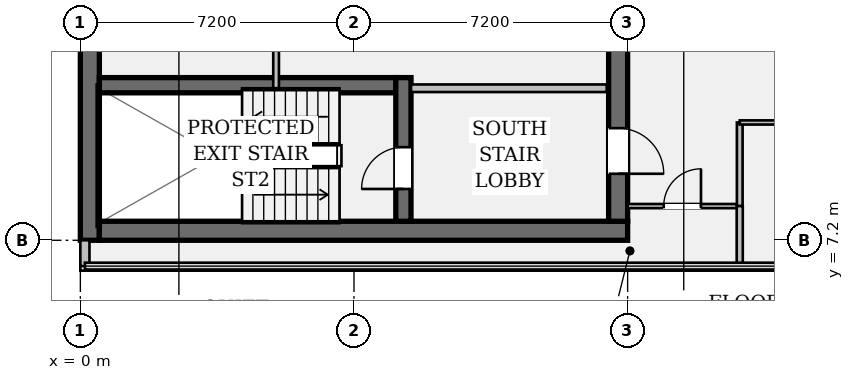
"""IFC4 building model, lengths in metres.
Left out: names, types, materials, properties, quantities, classifications, styles, units other than length and angle.
Written with IfcOpenShell. Run it as: python <this file> out.ifc"""

import sys

from ifc_helpers import new_model, si_unit, direction, frame, frame_2d, origin, place, context, subcontext, project, spatial, rectangle, extrude, element, fill, save


model = new_model("IFC4")
c1 = context("Model", 3, precision=1e-05, world=origin(), true_north=direction((0.0, 1.0)))
c2 = subcontext(c1, "Body", "Model", "MODEL_VIEW")
j1 = project(units=[si_unit("LENGTHUNIT", "METRE"), si_unit("PLANEANGLEUNIT", "RADIAN")], contexts=[c1])
p1 = place(None, origin())
s1 = spatial("IfcSite", under=j1, at=p1, CompositionType="ELEMENT")
p2 = place(p1, origin())
s2 = spatial("IfcBuilding", under=s1, at=p2, CompositionType="ELEMENT")
p3 = place(p2, frame((0.0, 0.0, 248.15)))
s3 = spatial("IfcBuildingStorey", under=s2, at=p3, CompositionType="ELEMENT", Elevation=248.15)
p4 = place(p3, frame((0.25, 7.2, 0.0), z_axis=(0.0, 0.0, 1.0), x_axis=(0.0, 1.0, 0.0)))
e1 = element("IfcWall", 1, at=p4, inside=s3, PredefinedType="SHEAR", context=c2, shape_type="SweptSolid", body=[
    extrude(rectangle(XDim=28.8, YDim=0.5, at=frame_2d((14.4, 0.0))), origin(), (0.0, 0.0, 1.0), 3.24),
])
p5 = place(p3, frame((0.5, 7.45, 0.0), z_axis=(0.0, 0.0, 1.0), x_axis=(1.0, 0.0, 0.0)))
e2 = element("IfcWall", 2, at=p5, inside=s3, PredefinedType="SHEAR", context=c2, shape_type="SweptSolid", body=[
    extrude(rectangle(XDim=13.9, YDim=0.5, at=frame_2d((6.95, 0.0))), origin(), (0.0, 0.0, 1.0), 3.24),
])
p6 = place(p3, frame((14.15, 35.5, 0.0), z_axis=(0.0, 0.0, 1.0), x_axis=(0.0, -1.0, 0.0)))
e3 = element("IfcWall", 3, at=p6, inside=s3, PredefinedType="SHEAR", context=c2, shape_type="SweptSolid", body=[
    extrude(rectangle(XDim=27.8, YDim=0.5, at=frame_2d((13.9, 0.0))), origin(), (0.0, 0.0, 1.0), 3.24),
])
p7 = place(p6, frame((1.4, 0.0, 0.0)))
e4 = element("IfcOpeningElement", 4, at=p7, cuts=e3, PredefinedType="OPENING", context=c2, shape_type="SweptSolid", body=[
    extrude(rectangle(XDim=1.2, YDim=2.15, at=frame_2d((0.6, 1.075))), frame((0.0, 0.262, 0.0), z_axis=(0.0, -1.0, 0.0), x_axis=(1.0, 0.0, 0.0)), (0.0, 0.0, 1.0), 0.524),
])
p8 = place(p6, frame((25.35, 0.0, 0.0)))
e5 = element("IfcOpeningElement", 5, at=p8, cuts=e3, PredefinedType="OPENING", context=c2, shape_type="SweptSolid", body=[
    extrude(rectangle(XDim=1.2, YDim=2.15, at=frame_2d((0.6, 1.075))), frame((0.0, 0.262, 0.0), z_axis=(0.0, -1.0, 0.0), x_axis=(1.0, 0.0, 0.0)), (0.0, 0.0, 1.0), 0.524),
])
p9 = place(p6, frame((14.7, 0.0, 0.0)))
e6 = element("IfcOpeningElement", 6, at=p9, cuts=e3, PredefinedType="OPENING", context=c2, shape_type="SweptSolid", body=[
    extrude(rectangle(XDim=1.6, YDim=2.2, at=frame_2d((0.8, 1.1))), frame((0.0, 0.262, 0.0), z_axis=(0.0, -1.0, 0.0), x_axis=(1.0, 0.0, 0.0)), (0.0, 0.0, 1.0), 0.524),
])
p10 = place(p3, frame((0.5, 11.28, 0.0), z_axis=(0.0, 0.0, 1.0), x_axis=(1.0, 0.0, 0.0)))
e7 = element("IfcWall", 7, at=p10, inside=s3, PredefinedType="SHEAR", context=c2, shape_type="SweptSolid", body=[
    extrude(rectangle(XDim=7.8, YDim=0.4, at=frame_2d((3.9, 0.0))), origin(), (0.0, 0.0, 1.0), 3.24),
])
p11 = place(p3, frame((8.5, 7.7, 0.0), z_axis=(0.0, 0.0, 1.0), x_axis=(0.0, 1.0, 0.0)))
e8 = element("IfcWall", 8, at=p11, inside=s3, PredefinedType="SHEAR", context=c2, shape_type="SweptSolid", body=[
    extrude(rectangle(XDim=3.78, YDim=0.4, at=frame_2d((1.89, 0.0))), origin(), (0.0, 0.0, 1.0), 3.24),
])
p12 = place(p11, frame((0.85, 0.0, 0.0)))
e9 = element("IfcOpeningElement", 9, at=p12, cuts=e8, PredefinedType="OPENING", context=c2, shape_type="SweptSolid", body=[
    extrude(rectangle(XDim=1.1, YDim=2.15, at=frame_2d((0.55, 1.075))), frame((0.0, 0.212, 0.0), z_axis=(0.0, -1.0, 0.0), x_axis=(1.0, 0.0, 0.0)), (0.0, 0.0, 1.0), 0.424),
])
p13 = place(p3, frame((0.12, 6.52, 0.0), z_axis=(0.0, 0.0, 1.0), x_axis=(0.0, 1.0, 0.0)))
e10 = element("IfcWall", 10, at=p13, inside=s3, PredefinedType="STANDARD", context=c2, shape_type="SweptSolid", body=[
    extrude(rectangle(XDim=0.68, YDim=0.24, at=frame_2d((0.34, 0.0))), origin(), (0.0, 0.0, 1.0), 3.24),
])
p14 = place(p3, frame((8.7, 11.2, 0.0), z_axis=(0.0, 0.0, 1.0), x_axis=(1.0, 0.0, 0.0)))
e11 = element("IfcWall", 11, at=p14, inside=s3, PredefinedType="PARTITIONING", context=c2, shape_type="SweptSolid", body=[
    extrude(rectangle(XDim=5.15, YDim=0.2, at=frame_2d((2.575, 0.0))), origin(), (0.0, 0.0, 1.0), 3.24),
])
p15 = place(p3, frame((5.15, 11.2, 0.0), z_axis=(0.0, 0.0, 1.0), x_axis=(0.0, 1.0, 0.0)))
e12 = element("IfcWall", 12, at=p15, inside=s3, PredefinedType="PARTITIONING", context=c2, shape_type="SweptSolid", body=[
    extrude(rectangle(XDim=6.6, YDim=0.15, at=frame_2d((3.3, 0.0))), origin(), (0.0, 0.0, 1.0), 3.24),
])
p16 = place(p3, frame((14.4, 8.1, 0.0), z_axis=(0.0, 0.0, 1.0), x_axis=(1.0, 0.0, 0.0)))
e13 = element("IfcWall", 13, at=p16, inside=s3, PredefinedType="PARTITIONING", context=c2, shape_type="SweptSolid", body=[
    extrude(rectangle(XDim=2.95, YDim=0.11, at=frame_2d((1.475, 0.0))), origin(), (0.0, 0.0, 1.0), 3.24),
])
p17 = place(p16, frame((0.95, 0.0, 0.0)))
e14 = element("IfcOpeningElement", 14, at=p17, cuts=e13, PredefinedType="OPENING", context=c2, shape_type="SweptSolid", body=[
    extrude(rectangle(XDim=0.98, YDim=2.15, at=frame_2d((0.49, 1.075))), frame((0.0, 0.067, 0.0), z_axis=(0.0, -1.0, 0.0), x_axis=(1.0, 0.0, 0.0)), (0.0, 0.0, 1.0), 0.134),
])
p18 = place(p3, frame((17.35, 8.1, 0.0), z_axis=(0.0, 0.0, 1.0), x_axis=(0.0, 1.0, 0.0)))
e15 = element("IfcWall", 15, at=p18, inside=s3, PredefinedType="PARTITIONING", context=c2, shape_type="SweptSolid", body=[
    extrude(rectangle(XDim=2.2, YDim=0.15, at=frame_2d((1.1, 0.0))), origin(), (0.0, 0.0, 1.0), 3.24),
])
p19 = place(p3, frame((17.35, 10.3, 0.0), z_axis=(0.0, 0.0, 1.0), x_axis=(1.0, 0.0, 0.0)))
e16 = element("IfcWall", 16, at=p19, inside=s3, PredefinedType="PARTITIONING", context=c2, shape_type="SweptSolid", body=[
    extrude(rectangle(XDim=6.6, YDim=0.11, at=frame_2d((3.3, 0.0))), origin(), (0.0, 0.0, 1.0), 2.676),
])
p20 = place(p19, frame((2.8, 0.0, 0.0)))
e17 = element("IfcOpeningElement", 17, at=p20, cuts=e16, PredefinedType="OPENING", context=c2, shape_type="SweptSolid", body=[
    extrude(rectangle(XDim=0.98, YDim=2.15, at=frame_2d((0.49, 1.075))), frame((0.0, 0.067, 0.0), z_axis=(0.0, -1.0, 0.0), x_axis=(1.0, 0.0, 0.0)), (0.0, 0.0, 1.0), 0.134),
])
p21 = place(p3, frame((17.35, 6.52, 0.0), z_axis=(0.0, 0.0, 1.0), x_axis=(0.0, 1.0, 0.0)))
e18 = element("IfcWall", 18, at=p21, inside=s3, PredefinedType="PARTITIONING", context=c2, shape_type="SweptSolid", body=[
    extrude(rectangle(XDim=1.58, YDim=0.16, at=frame_2d((0.79, 0.0))), origin(), (0.0, 0.0, 1.0), 3.24),
])
p22 = place(p12, origin())
e19 = element("IfcDoor", 19, at=p22, inside=s3, OperationType="SINGLE_SWING_LEFT", PredefinedType="DOOR", context=c2, shape_type="SweptSolid", body=[
    extrude(rectangle(XDim=1.1, YDim=2.15, at=frame_2d((0.55, 1.075))), frame((0.0, 0.025, 0.0), z_axis=(0.0, -1.0, 0.0), x_axis=(1.0, 0.0, 0.0)), (0.0, 0.0, 1.0), 0.05),
])
fill(e9, e19)
p23 = place(p8, origin())
e20 = element("IfcDoor", 20, at=p23, inside=s3, OperationType="SINGLE_SWING_RIGHT", PredefinedType="DOOR", context=c2, shape_type="SweptSolid", body=[
    extrude(rectangle(XDim=1.2, YDim=2.15, at=frame_2d((0.6, 1.075))), frame((0.0, 0.025, 0.0), z_axis=(0.0, -1.0, 0.0), x_axis=(1.0, 0.0, 0.0)), (0.0, 0.0, 1.0), 0.05),
])
fill(e5, e20)
p24 = place(p17, origin())
e21 = element("IfcDoor", 21, at=p24, inside=s3, OperationType="SINGLE_SWING_RIGHT", PredefinedType="DOOR", context=c2, shape_type="SweptSolid", body=[
    extrude(rectangle(XDim=0.98, YDim=2.15, at=frame_2d((0.49, 1.075))), frame((0.0, 0.025, 0.0), z_axis=(0.0, -1.0, 0.0), x_axis=(1.0, 0.0, 0.0)), (0.0, 0.0, 1.0), 0.05),
])
fill(e14, e21)
save(model, sys.argv[1])
